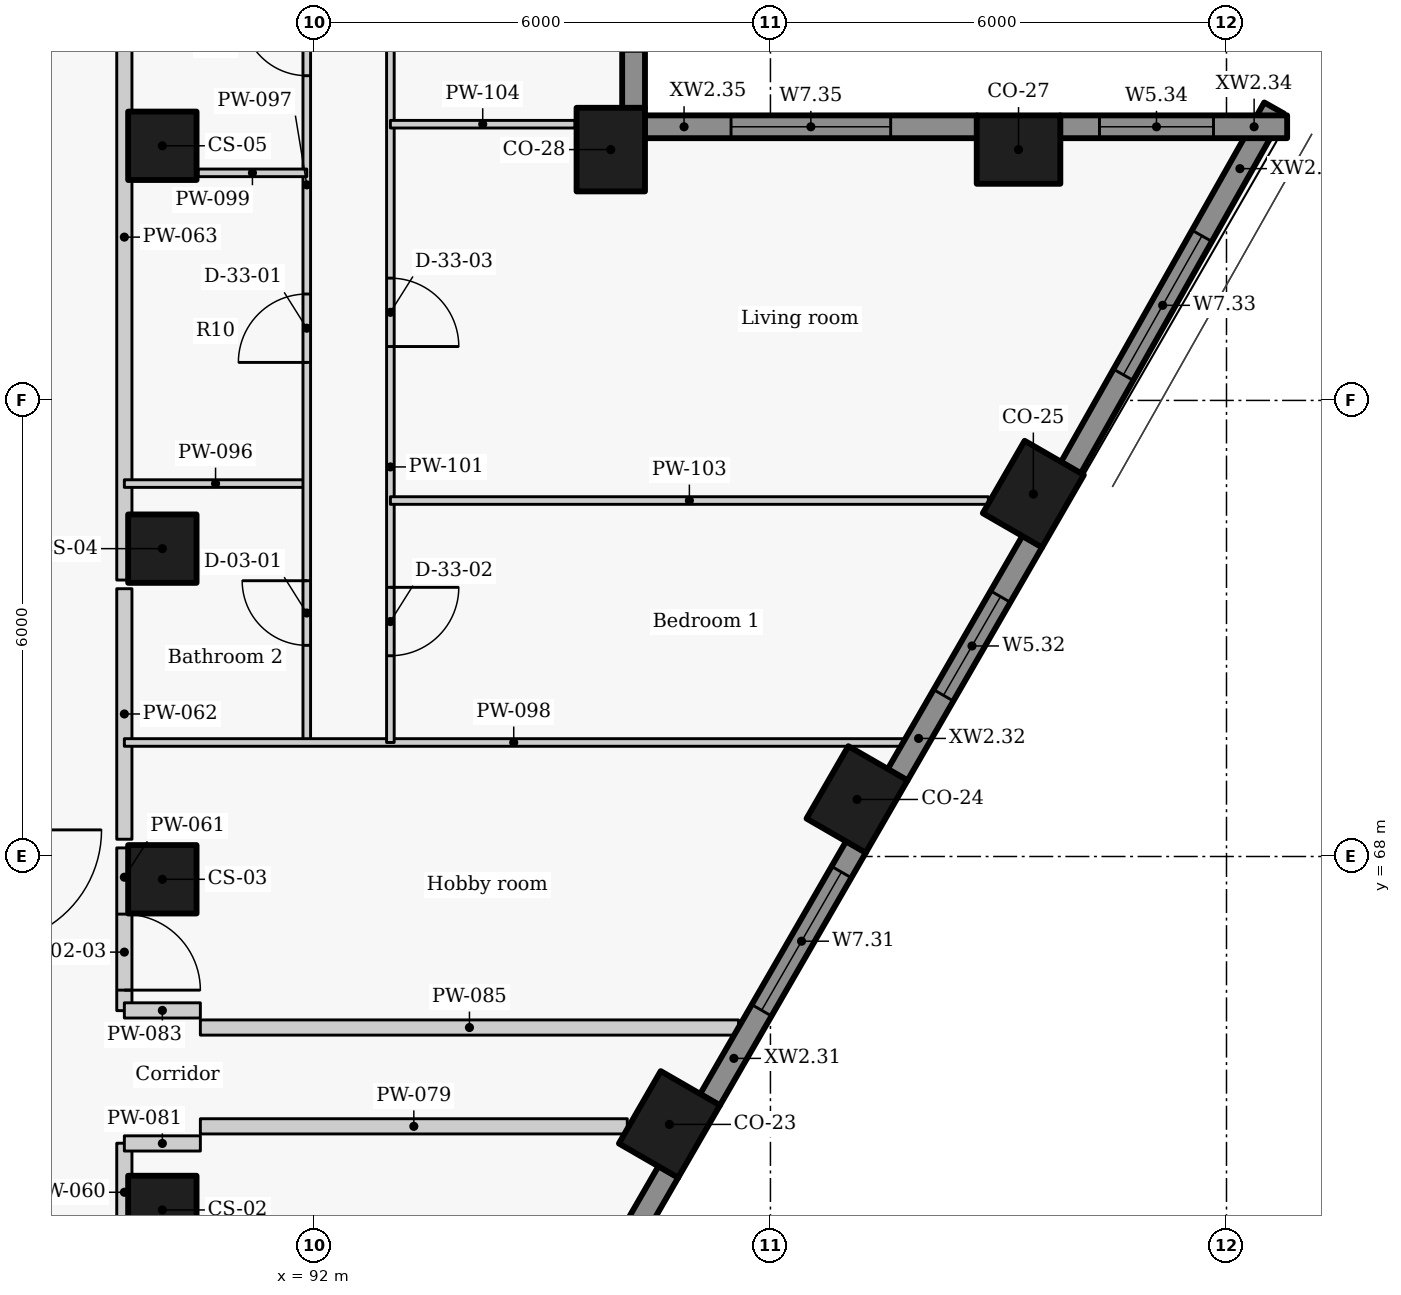
"""IFC4 building model, lengths in metres.
Left out: names, types, materials, properties, quantities, classifications, styles, units other than length and angle.
Written with IfcOpenShell. Run it as: python <this file> out.ifc"""

import sys

from ifc_helpers import new_model, si_unit, direction, frame, frame_2d, origin, origin_2d, place, context, subcontext, project, spatial, rectangle, extrude, element, fill, save


model = new_model("IFC4")
c1 = context("Model", 3, precision=1e-05, world=origin(), true_north=direction((0.0, 1.0)))
c2 = subcontext(c1, "Body", "Model", "MODEL_VIEW")
j1 = project(units=[si_unit("LENGTHUNIT", "METRE"), si_unit("PLANEANGLEUNIT", "RADIAN")], contexts=[c1])
p1 = place(None, origin())
s1 = spatial("IfcSite", under=j1, at=p1, CompositionType="ELEMENT")
p2 = place(p1, origin())
s2 = spatial("IfcBuilding", under=s1, at=p2, CompositionType="ELEMENT")
p3 = place(p2, frame((0.0, 0.0, 249.3)))
s3 = spatial("IfcBuildingStorey", under=s2, at=p3, CompositionType="ELEMENT", Elevation=249.3)
for number, where, z_axis, x_axis in (
    (1, (96.671, 64.475, 0.0), (0.0, 0.0, 1.0), (0.5, 0.866, 0.0)),
    (2, (99.139, 68.75, 0.0), (0.0, 0.0, 1.0), (0.5, 0.866, 0.0)),
    (3, (101.459, 72.768, 0.0), (0.0, 0.0, 1.0), (0.5, 0.866, 0.0)),
    (4, (101.264, 77.3, 0.0), (0.0, 0.0, 1.0), (-1.0, 0.0, 0.0)),
    (5, (95.899, 77.3, 0.0), (0.0, 0.0, 1.0), (0.0, 1.0, 0.0)),
):
    element("IfcColumn", number, at=place(p3, frame(where, z_axis=z_axis, x_axis=x_axis)), inside=s3, PredefinedType="COLUMN", context=c2, shape_type="SweptSolid", body=[
        extrude(rectangle(XDim=1.1, YDim=0.9, at=origin_2d()), origin(), (0.0, 0.0, 1.0), 3.3),
    ])
for number, where, z_axis, x_axis in (
    (6, (90.0, 63.35, 0.0), (0.0, 0.0, 1.0), (0.0, 1.0, 0.0)),
    (7, (90.0, 67.7, 0.0), (0.0, 0.0, 1.0), (0.0, 1.0, 0.0)),
    (8, (90.0, 72.05, 0.0), (0.0, 0.0, 1.0), (0.0, 1.0, 0.0)),
    (9, (90.0, 77.35, 0.0), (0.0, 0.0, 1.0), (0.0, 1.0, 0.0)),
):
    element("IfcColumn", number, at=place(p3, frame(where, z_axis=z_axis, x_axis=x_axis)), inside=s3, PredefinedType="COLUMN", context=c2, shape_type="SweptSolid", body=[
        extrude(rectangle(XDim=0.9, YDim=0.9, at=origin_2d()), origin(), (0.0, 0.0, 1.0), 3.3),
    ])
p4 = place(p3, frame((94.736, 60.523, 0.0), z_axis=(0.0, 0.0, 1.0), x_axis=(0.499984490703, 0.866034357896, 0.0)))
e10 = element("IfcWall", 10, at=p4, inside=s3, PredefinedType="SOLIDWALL", context=c2, shape_type="SweptSolid", body=[
    extrude(rectangle(XDim=3.844, YDim=0.3, at=frame_2d((1.922, 0.0))), origin(), (0.0, 0.0, 1.0), 2.425),
])
p5 = place(p4, frame((0.872, 0.0, 0.9)))
e11 = element("IfcOpeningElement", 11, at=p5, cuts=e10, PredefinedType="OPENING", context=c2, shape_type="SweptSolid", body=[
    extrude(rectangle(XDim=2.1, YDim=1.1, at=frame_2d((1.05, 0.55))), frame((0.0, 0.16, 0.0), z_axis=(0.0, -1.0, 0.0), x_axis=(1.0, 0.0, 0.0)), (0.0, 0.0, 1.0), 0.32),
])
p6 = place(p3, frame((97.204, 64.798, 0.0), z_axis=(0.0, 0.0, 1.0), x_axis=(0.499984490703, 0.866034357896, 0.0)))
e12 = element("IfcWall", 12, at=p6, inside=s3, PredefinedType="SOLIDWALL", context=c2, shape_type="SweptSolid", body=[
    extrude(rectangle(XDim=3.844, YDim=0.3, at=frame_2d((1.922, 0.0))), origin(), (0.0, 0.0, 1.0), 2.425),
])
p7 = place(p6, frame((1.361, 0.0, 0.9)))
e13 = element("IfcOpeningElement", 13, at=p7, cuts=e12, PredefinedType="OPENING", context=c2, shape_type="SweptSolid", body=[
    extrude(rectangle(XDim=2.1, YDim=1.1, at=frame_2d((1.05, 0.55))), frame((0.0, 0.16, 0.0), z_axis=(0.0, -1.0, 0.0), x_axis=(1.0, 0.0, 0.0)), (0.0, 0.0, 1.0), 0.32),
])
p8 = place(p3, frame((99.672, 69.073, 0.0), z_axis=(0.0, 0.0, 1.0), x_axis=(0.500010404316, 0.866019396766, 0.0)))
e14 = element("IfcWall", 14, at=p8, inside=s3, PredefinedType="SOLIDWALL", context=c2, shape_type="SweptSolid", body=[
    extrude(rectangle(XDim=3.547, YDim=0.3, at=frame_2d((1.774, 0.0))), origin(), (0.0, 0.0, 1.0), 2.425),
])
p9 = place(p8, frame((1.209, 0.0, 0.9)))
e15 = element("IfcOpeningElement", 15, at=p9, cuts=e14, PredefinedType="OPENING", context=c2, shape_type="SweptSolid", body=[
    extrude(rectangle(XDim=1.5, YDim=1.1, at=frame_2d((0.75, 0.55))), frame((0.0, 0.16, 0.0), z_axis=(0.0, -1.0, 0.0), x_axis=(1.0, 0.0, 0.0)), (0.0, 0.0, 1.0), 0.32),
])
p10 = place(p3, frame((101.952, 73.114, 0.0), z_axis=(0.0, 0.0, 1.0), x_axis=(0.492080931903, 0.870549456641, 0.0)))
e16 = element("IfcWall", 16, at=p10, inside=s3, PredefinedType="SOLIDWALL", context=c2, shape_type="SweptSolid", body=[
    extrude(rectangle(XDim=5.437, YDim=0.3, at=frame_2d((2.718, 0.0))), origin(), (0.0, 0.0, 1.0), 2.425),
])
p11 = place(p10, frame((1.406, 0.0, 0.9)))
e17 = element("IfcOpeningElement", 17, at=p11, cuts=e16, PredefinedType="OPENING", context=c2, shape_type="SweptSolid", body=[
    extrude(rectangle(XDim=2.1, YDim=1.1, at=frame_2d((1.05, 0.55))), frame((0.0, 0.16, 0.0), z_axis=(0.0, -1.0, 0.0), x_axis=(1.0, 0.0, 0.0)), (0.0, 0.0, 1.0), 0.32),
])
p12 = place(p3, frame((104.798, 77.6, 0.0), z_axis=(0.0, 0.0, 1.0), x_axis=(-1.0, 0.0, 0.0)))
e18 = element("IfcWall", 18, at=p12, inside=s3, PredefinedType="SOLIDWALL", context=c2, shape_type="SweptSolid", body=[
    extrude(rectangle(XDim=2.988, YDim=0.3, at=frame_2d((1.494, 0.0))), origin(), (0.0, 0.0, 1.0), 2.425),
])
p13 = place(p12, frame((0.969, 0.0, 0.9)))
e19 = element("IfcOpeningElement", 19, at=p13, cuts=e18, PredefinedType="OPENING", context=c2, shape_type="SweptSolid", body=[
    extrude(rectangle(XDim=1.5, YDim=1.1, at=frame_2d((0.75, 0.55))), frame((0.0, 0.16, 0.0), z_axis=(0.0, -1.0, 0.0), x_axis=(1.0, 0.0, 0.0)), (0.0, 0.0, 1.0), 0.32),
])
p14 = place(p3, frame((100.718, 77.6, 0.0), z_axis=(0.0, 0.0, 1.0), x_axis=(-1.0, 0.0, 0.0)))
e20 = element("IfcWall", 20, at=p14, inside=s3, PredefinedType="SOLIDWALL", context=c2, shape_type="SweptSolid", body=[
    extrude(rectangle(XDim=4.373, YDim=0.3, at=frame_2d((2.186, 0.0))), origin(), (0.0, 0.0, 1.0), 2.425),
])
p15 = place(p14, frame((1.136, 0.0, 0.9)))
e21 = element("IfcOpeningElement", 21, at=p15, cuts=e20, PredefinedType="OPENING", context=c2, shape_type="SweptSolid", body=[
    extrude(rectangle(XDim=2.1, YDim=1.1, at=frame_2d((1.05, 0.55))), frame((0.0, 0.16, 0.0), z_axis=(0.0, -1.0, 0.0), x_axis=(1.0, 0.0, 0.0)), (0.0, 0.0, 1.0), 0.32),
])
p16 = place(p3, frame((96.199, 77.846, 0.0), z_axis=(0.0, 0.0, 1.0), x_axis=(0.0, 1.0, 0.0)))
e22 = element("IfcWall", 22, at=p16, inside=s3, PredefinedType="SOLIDWALL", context=c2, shape_type="SweptSolid", body=[
    extrude(rectangle(XDim=4.408, YDim=0.3, at=frame_2d((2.204, 0.0))), origin(), (0.0, 0.0, 1.0), 2.425),
])
p17 = place(p16, frame((0.748, 0.0, 0.9)))
e23 = element("IfcOpeningElement", 23, at=p17, cuts=e22, PredefinedType="OPENING", context=c2, shape_type="SweptSolid", body=[
    extrude(rectangle(XDim=1.5, YDim=1.1, at=frame_2d((0.75, 0.55))), frame((0.0, 0.16, 0.0), z_axis=(0.0, -1.0, 0.0), x_axis=(1.0, 0.0, 0.0)), (0.0, 0.0, 1.0), 0.32),
])
p18 = place(p16, frame((3.215, 0.0, 0.9)))
e24 = element("IfcOpeningElement", 24, at=p18, cuts=e22, PredefinedType="OPENING", context=c2, shape_type="SweptSolid", body=[
    extrude(rectangle(XDim=0.9, YDim=1.1, at=frame_2d((0.45, 0.55))), frame((0.0, 0.16, 0.0), z_axis=(0.0, -1.0, 0.0), x_axis=(1.0, 0.0, 0.0)), (0.0, 0.0, 1.0), 0.32),
])
p19 = place(p3, frame((89.5, 62.937, 0.0), z_axis=(0.0, 0.0, 1.0), x_axis=(0.0, 1.0, 0.0)))
e25 = element("IfcWall", 25, at=p19, inside=s3, PredefinedType="PARTITIONING", context=c2, shape_type="SweptSolid", body=[
    extrude(rectangle(XDim=1.291, YDim=0.2, at=frame_2d((0.646, 0.0))), origin(), (0.0, 0.0, 1.0), 3.025),
])
p20 = place(p3, frame((89.5, 68.113, 0.0), z_axis=(0.0, 0.0, 1.0), x_axis=(0.0, -1.0, 0.0)))
e26 = element("IfcWall", 26, at=p20, inside=s3, PredefinedType="PARTITIONING", context=c2, shape_type="SweptSolid", body=[
    extrude(rectangle(XDim=2.141, YDim=0.2, at=frame_2d((1.071, 0.0))), origin(), (0.0, 0.0, 1.0), 3.025),
])
p21 = place(p20, frame((0.871, 0.0, 0.0)))
e27 = element("IfcOpeningElement", 27, at=p21, cuts=e26, PredefinedType="OPENING", context=c2, shape_type="SweptSolid", body=[
    extrude(rectangle(XDim=1.0, YDim=2.1, at=frame_2d((0.5, 1.05))), frame((0.0, 0.11, 0.0), z_axis=(0.0, -1.0, 0.0), x_axis=(1.0, 0.0, 0.0)), (0.0, 0.0, 1.0), 0.22),
])
p22 = place(p3, frame((89.5, 68.227, 0.0), z_axis=(0.0, 0.0, 1.0), x_axis=(0.0, 1.0, 0.0)))
e28 = element("IfcWall", 28, at=p22, inside=s3, PredefinedType="PARTITIONING", context=c2, shape_type="SweptSolid", body=[
    extrude(rectangle(XDim=3.296, YDim=0.2, at=frame_2d((1.648, 0.0))), origin(), (0.0, 0.0, 1.0), 3.025),
])
p23 = place(p3, frame((89.5, 82.123, 0.0), z_axis=(0.0, 0.0, 1.0), x_axis=(0.0, -1.0, 0.0)))
e29 = element("IfcWall", 29, at=p23, inside=s3, PredefinedType="PARTITIONING", context=c2, shape_type="SweptSolid", body=[
    extrude(rectangle(XDim=10.486, YDim=0.2, at=frame_2d((5.243, 0.0))), origin(), (0.0, 0.0, 1.0), 3.025),
])
p24 = place(p23, frame((0.363, 0.0, 0.0)))
e30 = element("IfcOpeningElement", 30, at=p24, cuts=e29, PredefinedType="OPENING", context=c2, shape_type="SweptSolid", body=[
    extrude(rectangle(XDim=1.0, YDim=2.1, at=frame_2d((0.5, 1.05))), frame((0.0, 0.11, 0.0), z_axis=(0.0, -1.0, 0.0), x_axis=(1.0, 0.0, 0.0)), (0.0, 0.0, 1.0), 0.22),
])
p25 = place(p3, frame((90.5, 64.45, 0.0), z_axis=(0.0, 0.0, 1.0), x_axis=(1.0, 0.0, 0.0)))
e31 = element("IfcWall", 31, at=p25, inside=s3, PredefinedType="PARTITIONING", context=c2, shape_type="SweptSolid", body=[
    extrude(rectangle(XDim=5.617, YDim=0.2, at=frame_2d((2.808, 0.0))), origin(), (0.0, 0.0, 1.0), 3.025),
])
for number, where, z_axis, x_axis in (
    (32, (89.5, 64.225, 0.0), (0.0, 0.0, 1.0), (1.0, 0.0, 0.0)),
    (33, (89.5, 65.975, 0.0), (0.0, 0.0, 1.0), (1.0, 0.0, 0.0)),
):
    element("IfcWall", number, at=place(p3, frame(where, z_axis=z_axis, x_axis=x_axis)), inside=s3, PredefinedType="PARTITIONING", context=c2, shape_type="SweptSolid", body=[
        extrude(rectangle(XDim=1.0, YDim=0.2, at=frame_2d((0.5, 0.0))), origin(), (0.0, 0.0, 1.0), 2.505),
    ])
p26 = place(p3, frame((90.5, 65.75, 0.0), z_axis=(0.0, 0.0, 1.0), x_axis=(1.0, 0.0, 0.0)))
e34 = element("IfcWall", 34, at=p26, inside=s3, PredefinedType="PARTITIONING", context=c2, shape_type="SweptSolid", body=[
    extrude(rectangle(XDim=7.08, YDim=0.2, at=frame_2d((3.54, 0.0))), origin(), (0.0, 0.0, 1.0), 2.405),
])
p27 = place(p3, frame((89.5, 72.906, 0.0), z_axis=(0.0, 0.0, 1.0), x_axis=(1.0, 0.0, 0.0)))
e35 = element("IfcWall", 35, at=p27, inside=s3, PredefinedType="PARTITIONING", context=c2, shape_type="SweptSolid", body=[
    extrude(rectangle(XDim=2.4, YDim=0.1, at=frame_2d((1.2, 0.0))), origin(), (0.0, 0.0, 1.0), 2.505),
])
p28 = place(p3, frame((91.9, 69.5, 0.0), z_axis=(0.0, 0.0, 1.0), x_axis=(0.0, 1.0, 0.0)))
e36 = element("IfcWall", 36, at=p28, inside=s3, PredefinedType="PARTITIONING", context=c2, shape_type="SweptSolid", body=[
    extrude(rectangle(XDim=10.9, YDim=0.1, at=frame_2d((5.45, 0.0))), origin(), (0.0, 0.0, 1.0), 3.025),
])
p29 = place(p28, frame((1.278, 0.0, 0.0)))
e37 = element("IfcOpeningElement", 37, at=p29, cuts=e36, PredefinedType="OPENING", context=c2, shape_type="SweptSolid", body=[
    extrude(rectangle(XDim=0.85, YDim=2.1, at=frame_2d((0.425, 1.05))), frame((0.0, 0.06, 0.0), z_axis=(0.0, -1.0, 0.0), x_axis=(1.0, 0.0, 0.0)), (0.0, 0.0, 1.0), 0.12),
])
p30 = place(p28, frame((5.0, 0.0, 0.0)))
e38 = element("IfcOpeningElement", 38, at=p30, cuts=e36, PredefinedType="OPENING", context=c2, shape_type="SweptSolid", body=[
    extrude(rectangle(XDim=0.9, YDim=2.1, at=frame_2d((0.45, 1.05))), frame((0.0, 0.06, 0.0), z_axis=(0.0, -1.0, 0.0), x_axis=(1.0, 0.0, 0.0)), (0.0, 0.0, 1.0), 0.12),
])
p31 = place(p28, frame((8.772, 0.0, 0.0)))
e39 = element("IfcOpeningElement", 39, at=p31, cuts=e36, PredefinedType="OPENING", context=c2, shape_type="SweptSolid", body=[
    extrude(rectangle(XDim=0.85, YDim=2.1, at=frame_2d((0.425, 1.05))), frame((0.0, 0.06, 0.0), z_axis=(0.0, -1.0, 0.0), x_axis=(1.0, 0.0, 0.0)), (0.0, 0.0, 1.0), 0.12),
])
p32 = place(p3, frame((89.5, 69.5, 0.0), z_axis=(0.0, 0.0, 1.0), x_axis=(1.0, 0.0, 0.0)))
e40 = element("IfcWall", 40, at=p32, inside=s3, PredefinedType="PARTITIONING", context=c2, shape_type="SweptSolid", body=[
    extrude(rectangle(XDim=10.245, YDim=0.1, at=frame_2d((5.123, 0.0))), origin(), (0.0, 0.0, 1.0), 2.405),
])
p33 = place(p3, frame((90.47, 76.994, 0.0), z_axis=(0.0, 0.0, 1.0), x_axis=(1.0, 0.0, 0.0)))
e41 = element("IfcWall", 41, at=p33, inside=s3, PredefinedType="PARTITIONING", context=c2, shape_type="SweptSolid", body=[
    extrude(rectangle(XDim=1.43, YDim=0.1, at=frame_2d((0.715, 0.0))), origin(), (0.0, 0.0, 1.0), 3.025),
])
p34 = place(p3, frame((93.0, 84.0, 0.0), z_axis=(0.0, 0.0, 1.0), x_axis=(0.0, -1.0, 0.0)))
e42 = element("IfcWall", 42, at=p34, inside=s3, PredefinedType="PARTITIONING", context=c2, shape_type="SweptSolid", body=[
    extrude(rectangle(XDim=14.5, YDim=0.1, at=frame_2d((7.25, 0.0))), origin(), (0.0, 0.0, 1.0), 3.025),
])
p35 = place(p34, frame((12.459, 0.0, 0.0)))
e43 = element("IfcOpeningElement", 43, at=p35, cuts=e42, PredefinedType="OPENING", context=c2, shape_type="SweptSolid", body=[
    extrude(rectangle(XDim=0.9, YDim=2.1, at=frame_2d((0.45, 1.05))), frame((0.0, 0.06, 0.0), z_axis=(0.0, -1.0, 0.0), x_axis=(1.0, 0.0, 0.0)), (0.0, 0.0, 1.0), 0.12),
])
p36 = place(p34, frame((8.391, 0.0, 0.0)))
e44 = element("IfcOpeningElement", 44, at=p36, cuts=e42, PredefinedType="OPENING", context=c2, shape_type="SweptSolid", body=[
    extrude(rectangle(XDim=0.9, YDim=2.1, at=frame_2d((0.45, 1.05))), frame((0.0, 0.06, 0.0), z_axis=(0.0, -1.0, 0.0), x_axis=(1.0, 0.0, 0.0)), (0.0, 0.0, 1.0), 0.12),
])
p37 = place(p34, frame((4.324, 0.0, 0.0)))
e45 = element("IfcOpeningElement", 45, at=p37, cuts=e42, PredefinedType="OPENING", context=c2, shape_type="SweptSolid", body=[
    extrude(rectangle(XDim=0.9, YDim=2.1, at=frame_2d((0.45, 1.05))), frame((0.0, 0.06, 0.0), z_axis=(0.0, -1.0, 0.0), x_axis=(1.0, 0.0, 0.0)), (0.0, 0.0, 1.0), 0.12),
])
p38 = place(p34, frame((1.141, 0.0, 0.0)))
e46 = element("IfcOpeningElement", 46, at=p38, cuts=e42, PredefinedType="OPENING", context=c2, shape_type="SweptSolid", body=[
    extrude(rectangle(XDim=0.9, YDim=2.1, at=frame_2d((0.45, 1.05))), frame((0.0, 0.06, 0.0), z_axis=(0.0, -1.0, 0.0), x_axis=(1.0, 0.0, 0.0)), (0.0, 0.0, 1.0), 0.12),
])
p39 = place(p3, frame((93.0, 72.683, 0.0), z_axis=(0.0, 0.0, 1.0), x_axis=(1.0, 0.0, 0.0)))
e47 = element("IfcWall", 47, at=p39, inside=s3, PredefinedType="PARTITIONING", context=c2, shape_type="SweptSolid", body=[
    extrude(rectangle(XDim=7.867, YDim=0.1, at=frame_2d((3.934, 0.0))), origin(), (0.0, 0.0, 1.0), 3.025),
])
p40 = place(p3, frame((93.0, 77.634, 0.0), z_axis=(0.0, 0.0, 1.0), x_axis=(1.0, 0.0, 0.0)))
e48 = element("IfcWall", 48, at=p40, inside=s3, PredefinedType="PARTITIONING", context=c2, shape_type="SweptSolid", body=[
    extrude(rectangle(XDim=2.429, YDim=0.1, at=frame_2d((1.215, 0.0))), origin(), (0.0, 0.0, 1.0), 3.025),
])
p41 = place(p7, origin())
e49 = element("IfcWindow", 49, at=p41, inside=s3, PartitioningType="SINGLE_PANEL", PredefinedType="WINDOW", context=c2, shape_type="SweptSolid", body=[
    extrude(rectangle(XDim=2.1, YDim=1.1, at=frame_2d((1.05, 0.55))), frame((0.0, 0.03, 0.0), z_axis=(0.0, -1.0, 0.0), x_axis=(1.0, 0.0, 0.0)), (0.0, 0.0, 1.0), 0.06),
])
fill(e13, e49)
p42 = place(p9, origin())
e50 = element("IfcWindow", 50, at=p42, inside=s3, PartitioningType="SINGLE_PANEL", PredefinedType="WINDOW", context=c2, shape_type="SweptSolid", body=[
    extrude(rectangle(XDim=1.5, YDim=1.1, at=frame_2d((0.75, 0.55))), frame((0.0, 0.03, 0.0), z_axis=(0.0, -1.0, 0.0), x_axis=(1.0, 0.0, 0.0)), (0.0, 0.0, 1.0), 0.06),
])
fill(e15, e50)
p43 = place(p11, origin())
e51 = element("IfcWindow", 51, at=p43, inside=s3, PartitioningType="SINGLE_PANEL", PredefinedType="WINDOW", context=c2, shape_type="SweptSolid", body=[
    extrude(rectangle(XDim=2.1, YDim=1.1, at=frame_2d((1.05, 0.55))), frame((0.0, 0.03, 0.0), z_axis=(0.0, -1.0, 0.0), x_axis=(1.0, 0.0, 0.0)), (0.0, 0.0, 1.0), 0.06),
])
fill(e17, e51)
p44 = place(p13, origin())
e52 = element("IfcWindow", 52, at=p44, inside=s3, PartitioningType="SINGLE_PANEL", PredefinedType="WINDOW", context=c2, shape_type="SweptSolid", body=[
    extrude(rectangle(XDim=1.5, YDim=1.1, at=frame_2d((0.75, 0.55))), frame((0.0, 0.03, 0.0), z_axis=(0.0, -1.0, 0.0), x_axis=(1.0, 0.0, 0.0)), (0.0, 0.0, 1.0), 0.06),
])
fill(e19, e52)
p45 = place(p15, origin())
e53 = element("IfcWindow", 53, at=p45, inside=s3, PartitioningType="SINGLE_PANEL", PredefinedType="WINDOW", context=c2, shape_type="SweptSolid", body=[
    extrude(rectangle(XDim=2.1, YDim=1.1, at=frame_2d((1.05, 0.55))), frame((0.0, 0.03, 0.0), z_axis=(0.0, -1.0, 0.0), x_axis=(1.0, 0.0, 0.0)), (0.0, 0.0, 1.0), 0.06),
])
fill(e21, e53)
p46 = place(p29, origin())
e54 = element("IfcDoor", 54, at=p46, inside=s3, OperationType="SINGLE_SWING_RIGHT", PredefinedType="DOOR", context=c2, shape_type="SweptSolid", body=[
    extrude(rectangle(XDim=0.85, YDim=2.1, at=frame_2d((0.425, 1.05))), frame((0.0, 0.025, 0.0), z_axis=(0.0, -1.0, 0.0), x_axis=(1.0, 0.0, 0.0)), (0.0, 0.0, 1.0), 0.05),
])
fill(e37, e54)
p47 = place(p30, origin())
e55 = element("IfcDoor", 55, at=p47, inside=s3, OperationType="SINGLE_SWING_LEFT", PredefinedType="DOOR", context=c2, shape_type="SweptSolid", body=[
    extrude(rectangle(XDim=0.9, YDim=2.1, at=frame_2d((0.45, 1.05))), frame((0.0, 0.025, 0.0), z_axis=(0.0, -1.0, 0.0), x_axis=(1.0, 0.0, 0.0)), (0.0, 0.0, 1.0), 0.05),
])
fill(e38, e55)
p48 = place(p31, origin())
e56 = element("IfcDoor", 56, at=p48, inside=s3, OperationType="SINGLE_SWING_RIGHT", PredefinedType="DOOR", context=c2, shape_type="SweptSolid", body=[
    extrude(rectangle(XDim=0.85, YDim=2.1, at=frame_2d((0.425, 1.05))), frame((0.0, 0.025, 0.0), z_axis=(0.0, -1.0, 0.0), x_axis=(1.0, 0.0, 0.0)), (0.0, 0.0, 1.0), 0.05),
])
fill(e39, e56)
p49 = place(p35, origin())
e57 = element("IfcDoor", 57, at=p49, inside=s3, OperationType="SINGLE_SWING_LEFT", PredefinedType="DOOR", context=c2, shape_type="SweptSolid", body=[
    extrude(rectangle(XDim=0.9, YDim=2.1, at=frame_2d((0.45, 1.05))), frame((0.0, 0.025, 0.0), z_axis=(0.0, -1.0, 0.0), x_axis=(1.0, 0.0, 0.0)), (0.0, 0.0, 1.0), 0.05),
])
fill(e43, e57)
p50 = place(p36, origin())
e58 = element("IfcDoor", 58, at=p50, inside=s3, OperationType="SINGLE_SWING_RIGHT", PredefinedType="DOOR", context=c2, shape_type="SweptSolid", body=[
    extrude(rectangle(XDim=0.9, YDim=2.1, at=frame_2d((0.45, 1.05))), frame((0.0, 0.025, 0.0), z_axis=(0.0, -1.0, 0.0), x_axis=(1.0, 0.0, 0.0)), (0.0, 0.0, 1.0), 0.05),
])
fill(e44, e58)
p51 = place(p21, origin())
e59 = element("IfcDoor", 59, at=p51, inside=s3, OperationType="SINGLE_SWING_RIGHT", PredefinedType="DOOR", context=c2, shape_type="SweptSolid", body=[
    extrude(rectangle(XDim=1.0, YDim=2.1, at=frame_2d((0.5, 1.05))), frame((0.0, 0.025, 0.0), z_axis=(0.0, -1.0, 0.0), x_axis=(1.0, 0.0, 0.0)), (0.0, 0.0, 1.0), 0.05),
])
fill(e27, e59)
save(model, sys.argv[1])
